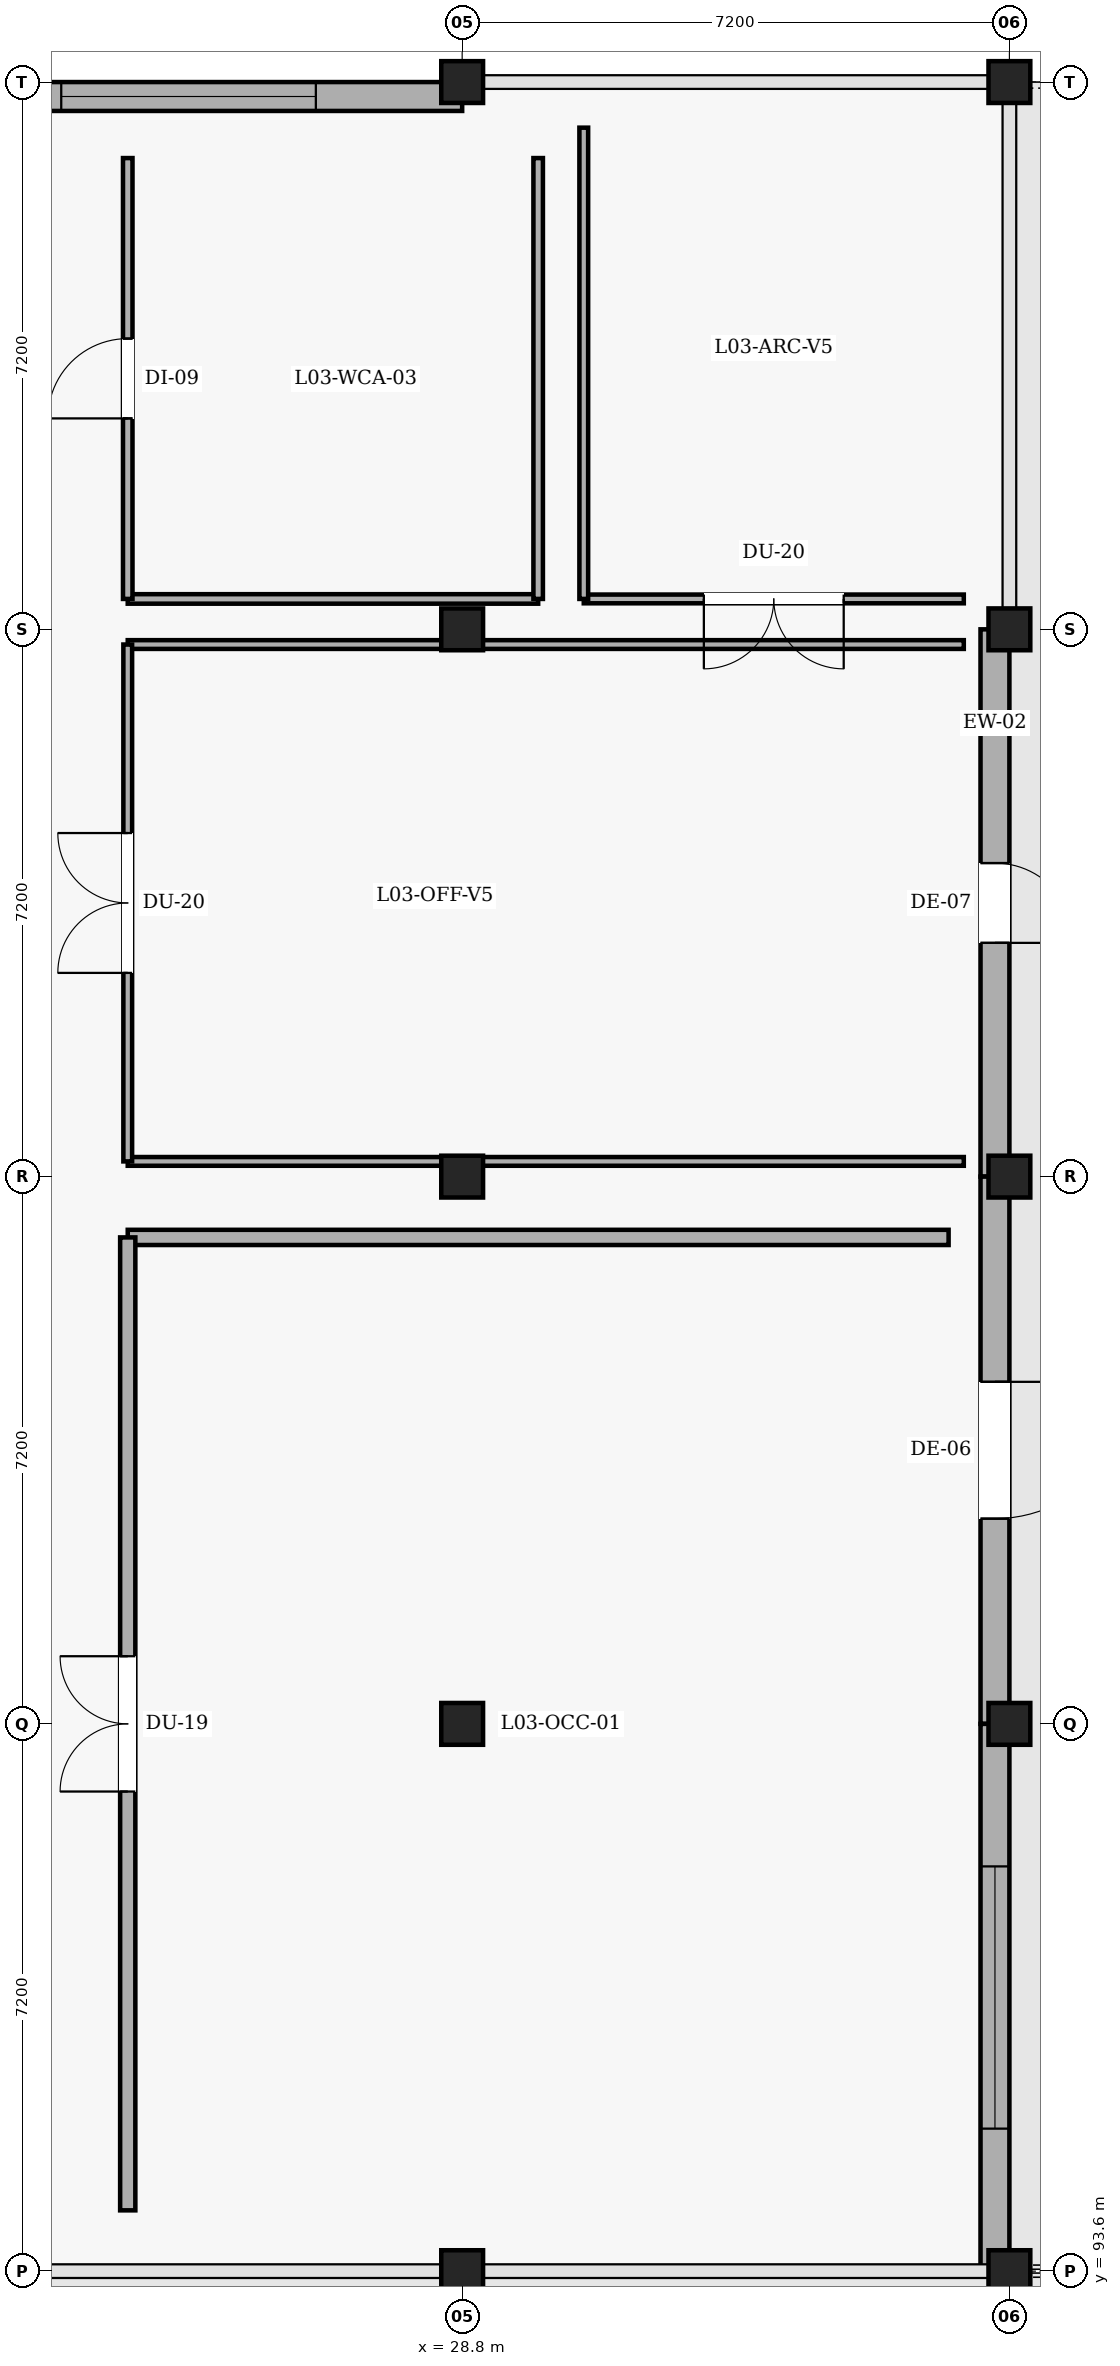
"""IFC4 building model, lengths in metres.
Left out: names, types, materials, properties, quantities, classifications, styles, units other than length and angle.
Written with IfcOpenShell. Run it as: python <this file> out.ifc"""

import sys

from ifc_helpers import new_model, si_unit, direction, frame, frame_2d, origin, origin_2d, place, context, subcontext, project, spatial, rectangle, extrude, element, fill, save


model = new_model("IFC4")
c1 = context("Model", 3, precision=1e-05, world=origin(), true_north=direction((0.0, 1.0)))
c2 = subcontext(c1, "Body", "Model", "MODEL_VIEW")
j1 = project(units=[si_unit("LENGTHUNIT", "METRE"), si_unit("PLANEANGLEUNIT", "RADIAN")], contexts=[c1])
p1 = place(None, origin())
s1 = spatial("IfcSite", under=j1, at=p1, CompositionType="ELEMENT")
p2 = place(p1, origin())
s2 = spatial("IfcBuilding", under=s1, at=p2, CompositionType="ELEMENT")
p3 = place(p2, frame((0.0, 0.0, 13.8)))
s3 = spatial("IfcBuildingStorey", under=s2, at=p3, CompositionType="ELEMENT", Elevation=13.8)
for number, where, z_axis, x_axis in (
    (1, (28.8, 93.6, 0.0), (0.0, 0.0, 1.0), (1.0, 0.0, 0.0)),
    (2, (28.8, 100.8, 0.0), (0.0, 0.0, 1.0), (1.0, 0.0, 0.0)),
    (3, (28.8, 108.0, 0.0), (0.0, 0.0, 1.0), (1.0, 0.0, 0.0)),
    (4, (28.8, 115.2, 0.0), (0.0, 0.0, 1.0), (1.0, 0.0, 0.0)),
    (5, (28.8, 122.4, 0.0), (0.0, 0.0, 1.0), (1.0, 0.0, 0.0)),
    (6, (36.0, 93.6, 0.0), (0.0, 0.0, 1.0), (1.0, 0.0, 0.0)),
    (7, (36.0, 100.8, 0.0), (0.0, 0.0, 1.0), (1.0, 0.0, 0.0)),
    (8, (36.0, 108.0, 0.0), (0.0, 0.0, 1.0), (1.0, 0.0, 0.0)),
    (9, (36.0, 115.2, 0.0), (0.0, 0.0, 1.0), (1.0, 0.0, 0.0)),
    (10, (36.0, 122.4, 0.0), (0.0, 0.0, 1.0), (1.0, 0.0, 0.0)),
):
    element("IfcColumn", number, at=place(p3, frame(where, z_axis=z_axis, x_axis=x_axis)), inside=s3, PredefinedType="COLUMN", context=c2, shape_type="SweptSolid", body=[
        extrude(rectangle(XDim=0.55, YDim=0.55, at=origin_2d()), origin(), (0.0, 0.0, 1.0), 3.9),
    ])
p4 = place(p3, frame((21.6, 122.21, 0.0), z_axis=(0.0, 0.0, 1.0), x_axis=(1.0, 0.0, 0.0)))
e11 = element("IfcWall", 11, at=p4, inside=s3, PredefinedType="SOLIDWALL", context=c2, shape_type="SweptSolid", body=[
    extrude(rectangle(XDim=7.2, YDim=0.38, at=frame_2d((3.6, 0.0))), origin(), (0.0, 0.0, 1.0), 3.6),
])
p5 = place(p4, frame((1.925, 0.0, 0.9)))
e12 = element("IfcOpeningElement", 12, at=p5, cuts=e11, PredefinedType="OPENING", context=c2, shape_type="SweptSolid", body=[
    extrude(rectangle(XDim=3.35, YDim=1.8, at=frame_2d((1.675, 0.9))), frame((0.0, 0.2, 0.0), z_axis=(0.0, -1.0, 0.0), x_axis=(1.0, 0.0, 0.0)), (0.0, 0.0, 1.0), 0.4),
])
p6 = place(p3, frame((35.81, 115.2, 0.0), z_axis=(0.0, 0.0, 1.0), x_axis=(0.0, -1.0, 0.0)))
e13 = element("IfcWall", 13, at=p6, inside=s3, PredefinedType="SOLIDWALL", context=c2, shape_type="SweptSolid", body=[
    extrude(rectangle(XDim=7.2, YDim=0.38, at=frame_2d((3.6, 0.0))), origin(), (0.0, 0.0, 1.0), 3.6),
])
p7 = place(p6, frame((3.075, 0.0, 0.0)))
e14 = element("IfcOpeningElement", 14, at=p7, cuts=e13, PredefinedType="OPENING", context=c2, shape_type="SweptSolid", body=[
    extrude(rectangle(XDim=1.05, YDim=2.2, at=frame_2d((0.525, 1.1))), frame((0.0, 0.2, 0.0), z_axis=(0.0, -1.0, 0.0), x_axis=(1.0, 0.0, 0.0)), (0.0, 0.0, 1.0), 0.4),
])
p8 = place(p3, frame((35.81, 108.0, 0.0), z_axis=(0.0, 0.0, 1.0), x_axis=(0.0, -1.0, 0.0)))
e15 = element("IfcWall", 15, at=p8, inside=s3, PredefinedType="SOLIDWALL", context=c2, shape_type="SweptSolid", body=[
    extrude(rectangle(XDim=7.2, YDim=0.38, at=frame_2d((3.6, 0.0))), origin(), (0.0, 0.0, 1.0), 3.6),
])
p9 = place(p8, frame((2.7, 0.0, 0.0)))
e16 = element("IfcOpeningElement", 16, at=p9, cuts=e15, PredefinedType="OPENING", context=c2, shape_type="SweptSolid", body=[
    extrude(rectangle(XDim=1.8, YDim=2.25, at=frame_2d((0.9, 1.125))), frame((0.0, 0.2, 0.0), z_axis=(0.0, -1.0, 0.0), x_axis=(1.0, 0.0, 0.0)), (0.0, 0.0, 1.0), 0.4),
])
p10 = place(p3, frame((35.81, 100.8, 0.0), z_axis=(0.0, 0.0, 1.0), x_axis=(0.0, -1.0, 0.0)))
e17 = element("IfcWall", 17, at=p10, inside=s3, PredefinedType="SOLIDWALL", context=c2, shape_type="SweptSolid", body=[
    extrude(rectangle(XDim=7.2, YDim=0.38, at=frame_2d((3.6, 0.0))), origin(), (0.0, 0.0, 1.0), 3.6),
])
p11 = place(p10, frame((1.875, 0.0, 0.9)))
e18 = element("IfcOpeningElement", 18, at=p11, cuts=e17, PredefinedType="OPENING", context=c2, shape_type="SweptSolid", body=[
    extrude(rectangle(XDim=3.45, YDim=1.85, at=frame_2d((1.725, 0.925))), frame((0.0, 0.2, 0.0), z_axis=(0.0, -1.0, 0.0), x_axis=(1.0, 0.0, 0.0)), (0.0, 0.0, 1.0), 0.4),
])
p12 = place(p3, frame((24.4, 107.2, 0.0), z_axis=(0.0, 0.0, 1.0), x_axis=(1.0, 0.0, 0.0)))
e19 = element("IfcWall", 19, at=p12, inside=s3, PredefinedType="PARTITIONING", context=c2, shape_type="SweptSolid", body=[
    extrude(rectangle(XDim=10.8, YDim=0.2, at=frame_2d((5.4, 0.0))), origin(), (0.0, 0.0, 1.0), 3.45),
])
p13 = place(p3, frame((24.4, 94.4, 0.0), z_axis=(0.0, 0.0, 1.0), x_axis=(0.0, 1.0, 0.0)))
e20 = element("IfcWall", 20, at=p13, inside=s3, PredefinedType="PARTITIONING", context=c2, shape_type="SweptSolid", body=[
    extrude(rectangle(XDim=12.8, YDim=0.2, at=frame_2d((6.4, 0.0))), origin(), (0.0, 0.0, 1.0), 3.45),
])
p14 = place(p13, frame((5.51, 0.0, 0.0)))
e21 = element("IfcOpeningElement", 21, at=p14, cuts=e20, PredefinedType="OPENING", context=c2, shape_type="SweptSolid", body=[
    extrude(rectangle(XDim=1.78, YDim=2.28, at=frame_2d((0.89, 1.14))), frame((0.0, 0.11, 0.0), z_axis=(0.0, -1.0, 0.0), x_axis=(1.0, 0.0, 0.0)), (0.0, 0.0, 1.0), 0.22),
])
p15 = place(p3, frame((29.8, 115.6, 0.0), z_axis=(0.0, 0.0, 1.0), x_axis=(-1.0, 0.0, 0.0)))
e22 = element("IfcWall", 22, at=p15, inside=s3, PredefinedType="PARTITIONING", context=c2, shape_type="SweptSolid", body=[
    extrude(rectangle(XDim=5.4, YDim=0.125, at=frame_2d((2.7, 0.0))), origin(), (0.0, 0.0, 1.0), 3.45),
])
p16 = place(p3, frame((29.8, 121.4, 0.0), z_axis=(0.0, 0.0, 1.0), x_axis=(0.0, -1.0, 0.0)))
e23 = element("IfcWall", 23, at=p16, inside=s3, PredefinedType="PARTITIONING", context=c2, shape_type="SweptSolid", body=[
    extrude(rectangle(XDim=5.8, YDim=0.125, at=frame_2d((2.9, 0.0))), origin(), (0.0, 0.0, 1.0), 3.68),
])
p17 = place(p3, frame((24.4, 115.6, 0.0), z_axis=(0.0, 0.0, 1.0), x_axis=(0.0, 1.0, 0.0)))
e24 = element("IfcWall", 24, at=p17, inside=s3, PredefinedType="PARTITIONING", context=c2, shape_type="SweptSolid", body=[
    extrude(rectangle(XDim=5.8, YDim=0.125, at=frame_2d((2.9, 0.0))), origin(), (0.0, 0.0, 1.0), 3.63),
])
p18 = place(p17, frame((2.375, 0.0, 0.0)))
e25 = element("IfcOpeningElement", 25, at=p18, cuts=e24, PredefinedType="OPENING", context=c2, shape_type="SweptSolid", body=[
    extrude(rectangle(XDim=1.05, YDim=2.1, at=frame_2d((0.525, 1.05))), frame((0.0, 0.073, 0.0), z_axis=(0.0, -1.0, 0.0), x_axis=(1.0, 0.0, 0.0)), (0.0, 0.0, 1.0), 0.145),
])
for number, where, z_axis, x_axis in (
    (26, (24.4, 115.0, 0.0), (0.0, 0.0, 1.0), (1.0, 0.0, 0.0)),
    (27, (35.4, 108.2, 0.0), (0.0, 0.0, 1.0), (-1.0, 0.0, 0.0)),
):
    element("IfcWall", number, at=place(p3, frame(where, z_axis=z_axis, x_axis=x_axis)), inside=s3, PredefinedType="PARTITIONING", context=c2, shape_type="SweptSolid", body=[
        extrude(rectangle(XDim=11.0, YDim=0.115, at=frame_2d((5.5, 0.0))), origin(), (0.0, 0.0, 1.0), 3.45),
    ])
p19 = place(p3, frame((24.4, 108.2, 0.0), z_axis=(0.0, 0.0, 1.0), x_axis=(0.0, 1.0, 0.0)))
e28 = element("IfcWall", 28, at=p19, inside=s3, PredefinedType="PARTITIONING", context=c2, shape_type="SweptSolid", body=[
    extrude(rectangle(XDim=6.8, YDim=0.115, at=frame_2d((3.4, 0.0))), origin(), (0.0, 0.0, 1.0), 3.63),
])
p20 = place(p19, frame((2.48, 0.0, 0.0)))
e29 = element("IfcOpeningElement", 29, at=p20, cuts=e28, PredefinedType="OPENING", context=c2, shape_type="SweptSolid", body=[
    extrude(rectangle(XDim=1.84, YDim=2.24, at=frame_2d((0.92, 1.12))), frame((0.0, 0.067, 0.0), z_axis=(0.0, -1.0, 0.0), x_axis=(1.0, 0.0, 0.0)), (0.0, 0.0, 1.0), 0.135),
])
p21 = place(p3, frame((35.4, 115.6, 0.0), z_axis=(0.0, 0.0, 1.0), x_axis=(-1.0, 0.0, 0.0)))
e30 = element("IfcWall", 30, at=p21, inside=s3, PredefinedType="PARTITIONING", context=c2, shape_type="SweptSolid", body=[
    extrude(rectangle(XDim=5.0, YDim=0.115, at=frame_2d((2.5, 0.0))), origin(), (0.0, 0.0, 1.0), 3.85),
])
p22 = place(p21, frame((1.58, 0.0, 0.0)))
e31 = element("IfcOpeningElement", 31, at=p22, cuts=e30, PredefinedType="OPENING", context=c2, shape_type="SweptSolid", body=[
    extrude(rectangle(XDim=1.84, YDim=2.24, at=frame_2d((0.92, 1.12))), frame((0.0, 0.067, 0.0), z_axis=(0.0, -1.0, 0.0), x_axis=(1.0, 0.0, 0.0)), (0.0, 0.0, 1.0), 0.135),
])
p23 = place(p3, frame((30.4, 115.6, 0.0), z_axis=(0.0, 0.0, 1.0), x_axis=(0.0, 1.0, 0.0)))
e32 = element("IfcWall", 32, at=p23, inside=s3, PredefinedType="PARTITIONING", context=c2, shape_type="SweptSolid", body=[
    extrude(rectangle(XDim=6.2, YDim=0.115, at=frame_2d((3.1, 0.0))), origin(), (0.0, 0.0, 1.0), 3.68),
])
p24 = place(p5, origin())
e33 = element("IfcWindow", 33, at=p24, inside=s3, PartitioningType="SINGLE_PANEL", PredefinedType="WINDOW", context=c2, shape_type="SweptSolid", body=[
    extrude(rectangle(XDim=3.35, YDim=1.8, at=frame_2d((1.675, 0.9))), frame((0.0, 0.03, 0.0), z_axis=(0.0, -1.0, 0.0), x_axis=(1.0, 0.0, 0.0)), (0.0, 0.0, 1.0), 0.06),
])
fill(e12, e33)
p25 = place(p7, origin())
e34 = element("IfcDoor", 34, at=p25, inside=s3, OperationType="SINGLE_SWING_RIGHT", PredefinedType="DOOR", context=c2, shape_type="SweptSolid", body=[
    extrude(rectangle(XDim=1.05, YDim=2.2, at=frame_2d((0.525, 1.1))), frame((0.0, 0.025, 0.0), z_axis=(0.0, -1.0, 0.0), x_axis=(1.0, 0.0, 0.0)), (0.0, 0.0, 1.0), 0.05),
])
fill(e14, e34)
p26 = place(p9, origin())
e35 = element("IfcDoor", 35, at=p26, inside=s3, OperationType="SINGLE_SWING_LEFT", PredefinedType="DOOR", context=c2, shape_type="SweptSolid", body=[
    extrude(rectangle(XDim=1.8, YDim=2.25, at=frame_2d((0.9, 1.125))), frame((0.0, 0.025, 0.0), z_axis=(0.0, -1.0, 0.0), x_axis=(1.0, 0.0, 0.0)), (0.0, 0.0, 1.0), 0.05),
])
fill(e16, e35)
p27 = place(p11, origin())
e36 = element("IfcWindow", 36, at=p27, inside=s3, PartitioningType="SINGLE_PANEL", PredefinedType="WINDOW", context=c2, shape_type="SweptSolid", body=[
    extrude(rectangle(XDim=3.45, YDim=1.85, at=frame_2d((1.725, 0.925))), frame((0.0, 0.03, 0.0), z_axis=(0.0, -1.0, 0.0), x_axis=(1.0, 0.0, 0.0)), (0.0, 0.0, 1.0), 0.06),
])
fill(e18, e36)
p28 = place(p14, origin())
e37 = element("IfcDoor", 37, at=p28, inside=s3, OperationType="DOUBLE_DOOR_SINGLE_SWING", PredefinedType="DOOR", context=c2, shape_type="SweptSolid", body=[
    extrude(rectangle(XDim=1.78, YDim=2.28, at=frame_2d((0.89, 1.14))), frame((0.0, 0.025, 0.0), z_axis=(0.0, -1.0, 0.0), x_axis=(1.0, 0.0, 0.0)), (0.0, 0.0, 1.0), 0.05),
])
fill(e21, e37)
p29 = place(p18, origin())
e38 = element("IfcDoor", 38, at=p29, inside=s3, OperationType="SINGLE_SWING_LEFT", PredefinedType="DOOR", context=c2, shape_type="SweptSolid", body=[
    extrude(rectangle(XDim=1.05, YDim=2.1, at=frame_2d((0.525, 1.05))), frame((0.0, 0.025, 0.0), z_axis=(0.0, -1.0, 0.0), x_axis=(1.0, 0.0, 0.0)), (0.0, 0.0, 1.0), 0.05),
])
fill(e25, e38)
p30 = place(p20, origin())
e39 = element("IfcDoor", 39, at=p30, inside=s3, OperationType="DOUBLE_DOOR_SINGLE_SWING", PredefinedType="DOOR", context=c2, shape_type="SweptSolid", body=[
    extrude(rectangle(XDim=1.84, YDim=2.24, at=frame_2d((0.92, 1.12))), frame((0.0, 0.025, 0.0), z_axis=(0.0, -1.0, 0.0), x_axis=(1.0, 0.0, 0.0)), (0.0, 0.0, 1.0), 0.05),
])
fill(e29, e39)
p31 = place(p22, origin())
e40 = element("IfcDoor", 40, at=p31, inside=s3, OperationType="DOUBLE_DOOR_SINGLE_SWING", PredefinedType="DOOR", context=c2, shape_type="SweptSolid", body=[
    extrude(rectangle(XDim=1.84, YDim=2.24, at=frame_2d((0.92, 1.12))), frame((0.0, 0.025, 0.0), z_axis=(0.0, -1.0, 0.0), x_axis=(1.0, 0.0, 0.0)), (0.0, 0.0, 1.0), 0.05),
])
fill(e31, e40)
save(model, sys.argv[1])
